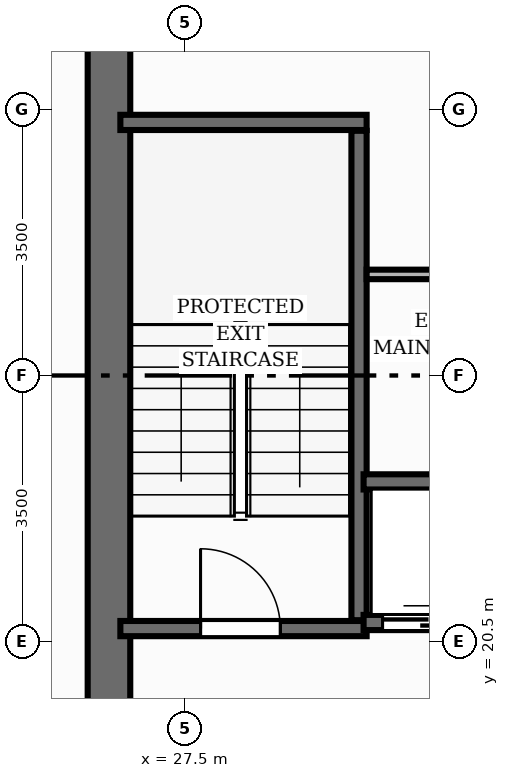
"""IFC4 building model, lengths in metres.
Left out: names, types, materials, properties, quantities, classifications, styles, units other than length and angle.
Written with IfcOpenShell. Run it as: python <this file> out.ifc"""

import sys

from ifc_helpers import new_model, si_unit, direction, frame, frame_2d, origin, place, context, subcontext, project, spatial, rectangle, extrude, element, fill, save


model = new_model("IFC4")
c1 = context("Model", 3, precision=1e-05, world=origin(), true_north=direction((0.0, 1.0)))
c2 = subcontext(c1, "Body", "Model", "MODEL_VIEW")
j1 = project(units=[si_unit("LENGTHUNIT", "METRE"), si_unit("PLANEANGLEUNIT", "RADIAN")], contexts=[c1])
p1 = place(None, origin())
s1 = spatial("IfcSite", under=j1, at=p1, CompositionType="ELEMENT")
p2 = place(p1, origin())
s2 = spatial("IfcBuilding", under=s1, at=p2, CompositionType="ELEMENT")
p3 = place(p2, frame((0.0, 0.0, 227.04)))
s3 = spatial("IfcBuildingStorey", under=s2, at=p3, CompositionType="ELEMENT", Elevation=227.04)
p4 = place(p3, frame((26.5, 17.28, 0.0), z_axis=(0.0, 0.0, 1.0), x_axis=(0.0, 1.0, 0.0)))
e1 = element("IfcWall", 1, at=p4, inside=s3, PredefinedType="SHEAR", context=c2, shape_type="SweptSolid", body=[
    extrude(rectangle(XDim=13.44, YDim=0.56, at=frame_2d((6.72, 0.0))), origin(), (0.0, 0.0, 1.0), 3.2),
])
p5 = place(p3, frame((29.79, 20.78, 0.0), z_axis=(0.0, 0.0, 1.0), x_axis=(0.0, 1.0, 0.0)))
e2 = element("IfcWall", 2, at=p5, inside=s3, PredefinedType="SHEAR", context=c2, shape_type="SweptSolid", body=[
    extrude(rectangle(XDim=6.44, YDim=0.2, at=frame_2d((3.22, 0.0))), origin(), (0.0, 0.0, 1.0), 3.2),
])
p6 = place(p3, frame((26.65, 27.33, 0.0), z_axis=(0.0, 0.0, 1.0), x_axis=(1.0, 0.0, 0.0)))
e3 = element("IfcWall", 3, at=p6, inside=s3, PredefinedType="SHEAR", context=c2, shape_type="SweptSolid", body=[
    extrude(rectangle(XDim=3.24, YDim=0.2, at=frame_2d((1.62, 0.0))), origin(), (0.0, 0.0, 1.0), 3.2),
])
p7 = place(p3, frame((26.65, 20.67, 0.0), z_axis=(0.0, 0.0, 1.0), x_axis=(1.0, 0.0, 0.0)))
e4 = element("IfcWall", 4, at=p7, inside=s3, PredefinedType="SHEAR", context=c2, shape_type="SweptSolid", body=[
    extrude(rectangle(XDim=3.24, YDim=0.2, at=frame_2d((1.62, 0.0))), origin(), (0.0, 0.0, 1.0), 3.2),
])
p8 = place(p7, frame((1.055, 0.0, 0.0)))
e5 = element("IfcOpeningElement", 5, at=p8, cuts=e4, PredefinedType="OPENING", context=c2, shape_type="SweptSolid", body=[
    extrude(rectangle(XDim=1.05, YDim=2.15, at=frame_2d((0.525, 1.075))), frame((0.0, 0.11, 0.0), z_axis=(0.0, -1.0, 0.0), x_axis=(1.0, 0.0, 0.0)), (0.0, 0.0, 1.0), 0.22),
])
p9 = place(p3, frame((29.85, 20.75, 0.0), z_axis=(0.0, 0.0, 1.0), x_axis=(1.0, 0.0, 0.0)))
e6 = element("IfcWall", 6, at=p9, inside=s3, PredefinedType="SHEAR", context=c2, shape_type="SweptSolid", body=[
    extrude(rectangle(XDim=2.3, YDim=0.2, at=frame_2d((1.15, 0.0))), origin(), (0.0, 0.0, 1.0), 3.2),
])
p10 = place(p9, frame((0.25, 0.0, 0.0)))
e7 = element("IfcOpeningElement", 7, at=p10, cuts=e6, PredefinedType="OPENING", context=c2, shape_type="SweptSolid", body=[
    extrude(rectangle(XDim=1.1, YDim=2.15, at=frame_2d((0.55, 1.075))), frame((0.0, 0.11, 0.0), z_axis=(0.0, -1.0, 0.0), x_axis=(1.0, 0.0, 0.0)), (0.0, 0.0, 1.0), 0.22),
])
p11 = place(p3, frame((29.85, 22.6, 0.0), z_axis=(0.0, 0.0, 1.0), x_axis=(1.0, 0.0, 0.0)))
e8 = element("IfcWall", 8, at=p11, inside=s3, PredefinedType="SHEAR", context=c2, shape_type="SweptSolid", body=[
    extrude(rectangle(XDim=2.3, YDim=0.2, at=frame_2d((1.15, 0.0))), origin(), (0.0, 0.0, 1.0), 3.2),
])
p12 = place(p3, frame((29.89, 25.33, 0.0), z_axis=(0.0, 0.0, 1.0), x_axis=(1.0, 0.0, 0.0)))
e9 = element("IfcWall", 9, at=p12, inside=s3, PredefinedType="PARTITIONING", context=c2, shape_type="SweptSolid", body=[
    extrude(rectangle(XDim=1.94, YDim=0.125, at=frame_2d((0.97, 0.0))), origin(), (0.0, 0.0, 1.0), 2.955),
])
p13 = place(p8, origin())
e10 = element("IfcDoor", 10, at=p13, inside=s3, OperationType="SINGLE_SWING_LEFT", PredefinedType="DOOR", context=c2, shape_type="SweptSolid", body=[
    extrude(rectangle(XDim=1.05, YDim=2.15, at=frame_2d((0.525, 1.075))), frame((0.0, 0.025, 0.0), z_axis=(0.0, -1.0, 0.0), x_axis=(1.0, 0.0, 0.0)), (0.0, 0.0, 1.0), 0.05),
])
fill(e5, e10)
p14 = place(p10, origin())
e11 = element("IfcDoor", 11, at=p14, inside=s3, OperationType="DOUBLE_DOOR_SLIDING", PredefinedType="DOOR", context=c2, shape_type="SweptSolid", body=[
    extrude(rectangle(XDim=1.1, YDim=2.15, at=frame_2d((0.55, 1.075))), frame((0.0, 0.025, 0.0), z_axis=(0.0, -1.0, 0.0), x_axis=(1.0, 0.0, 0.0)), (0.0, 0.0, 1.0), 0.05),
])
fill(e7, e11)
save(model, sys.argv[1])
